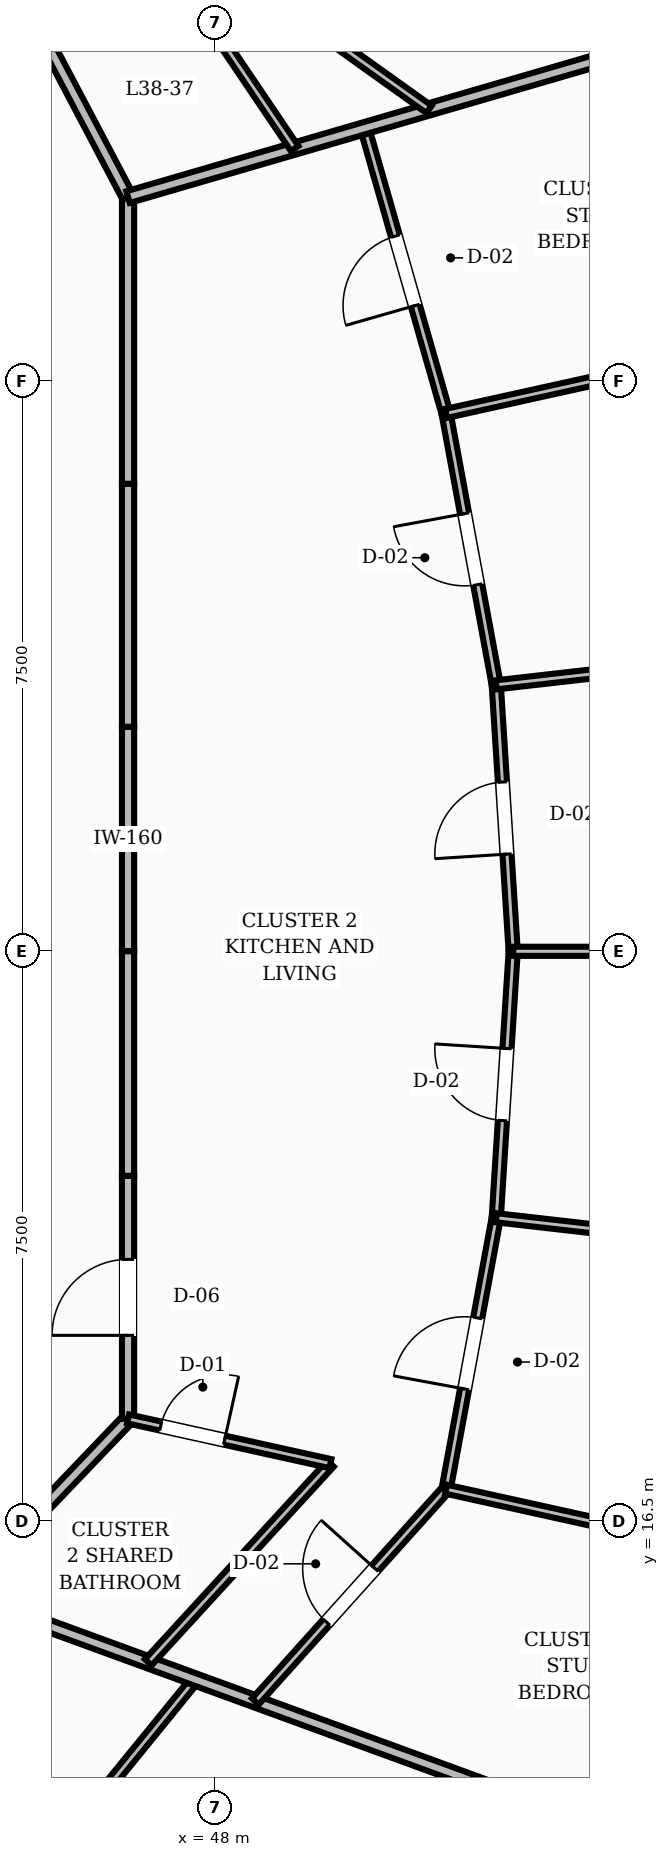
"""IFC4 building model, lengths in metres.
Left out: names, types, materials, properties, quantities, classifications, styles, units other than length and angle.
Written with IfcOpenShell. Run it as: python <this file> out.ifc"""

import sys

from ifc_helpers import new_model, si_unit, direction, frame, frame_2d, origin, place, context, subcontext, project, spatial, rectangle, extrude, element, fill, save


model = new_model("IFC4")
c1 = context("Model", 3, precision=1e-05, world=origin(), true_north=direction((0.0, 1.0)))
c2 = subcontext(c1, "Body", "Model", "MODEL_VIEW")
j1 = project(units=[si_unit("LENGTHUNIT", "METRE"), si_unit("PLANEANGLEUNIT", "RADIAN")], contexts=[c1])
p1 = place(None, origin())
s1 = spatial("IfcSite", under=j1, at=p1, CompositionType="ELEMENT")
p2 = place(p1, origin())
s2 = spatial("IfcBuilding", under=s1, at=p2, CompositionType="ELEMENT")
p3 = place(p2, frame((0.0, 0.0, 149.6)))
s3 = spatial("IfcBuildingStorey", under=s2, at=p3, CompositionType="ELEMENT", Elevation=149.6)
p4 = place(p3, frame((46.85, 24.0, 0.0), z_axis=(0.0, 0.0, 1.0), x_axis=(0.0, 1.0, 0.0)))
e1 = element("IfcWall", 1, at=p4, inside=s3, PredefinedType="SOLIDWALL", context=c2, shape_type="SweptSolid", body=[
    extrude(rectangle(XDim=2.954, YDim=0.16, at=frame_2d((1.477, 0.0))), origin(), (0.0, 0.0, 1.0), 2.8),
])
p5 = place(p3, frame((46.85, 26.954, 0.0), z_axis=(0.0, 0.0, 1.0), x_axis=(0.0, 1.0, 0.0)))
e2 = element("IfcWall", 2, at=p5, inside=s3, PredefinedType="SOLIDWALL", context=c2, shape_type="SweptSolid", body=[
    extrude(rectangle(XDim=3.197, YDim=0.16, at=frame_2d((1.599, 0.0))), origin(), (0.0, 0.0, 1.0), 2.8),
])
p6 = place(p3, frame((46.85, 30.151, 0.0), z_axis=(0.0, 0.0, 1.0), x_axis=(0.0, 1.0, 0.0)))
e3 = element("IfcWall", 3, at=p6, inside=s3, PredefinedType="SOLIDWALL", context=c2, shape_type="SweptSolid", body=[
    extrude(rectangle(XDim=3.771, YDim=0.16, at=frame_2d((1.886, 0.0))), origin(), (0.0, 0.0, 1.0), 2.8),
])
p7 = place(p3, frame((46.85, 33.923, 0.0), z_axis=(0.0, 0.0, 1.0), x_axis=(-0.466093963429, 0.884735224378, 0.0)))
e4 = element("IfcWall", 4, at=p7, inside=s3, PredefinedType="SOLIDWALL", context=c2, shape_type="SweptSolid", body=[
    extrude(rectangle(XDim=3.648, YDim=0.16, at=frame_2d((1.824, 0.0))), origin(), (0.0, 0.0, 1.0), 2.8),
])
p8 = place(p3, frame((44.65, 15.548, 0.0), z_axis=(0.0, 0.0, 1.0), x_axis=(0.691055487108, 0.722801711216, 0.0)))
e5 = element("IfcWall", 5, at=p8, inside=s3, PredefinedType="SOLIDWALL", context=c2, shape_type="SweptSolid", body=[
    extrude(rectangle(XDim=3.184, YDim=0.16, at=frame_2d((1.592, 0.0))), origin(), (0.0, 0.0, 1.0), 2.8),
])
p9 = place(p3, frame((46.85, 17.849, 0.0), z_axis=(0.0, 0.0, 1.0), x_axis=(0.0, 1.0, 0.0)))
e6 = element("IfcWall", 6, at=p9, inside=s3, PredefinedType="SOLIDWALL", context=c2, shape_type="SweptSolid", body=[
    extrude(rectangle(XDim=3.197, YDim=0.16, at=frame_2d((1.599, 0.0))), origin(), (0.0, 0.0, 1.0), 2.8),
])
p10 = place(p9, frame((1.099, 0.0, 0.0)))
e7 = element("IfcOpeningElement", 7, at=p10, cuts=e6, PredefinedType="OPENING", context=c2, shape_type="SweptSolid", body=[
    extrude(rectangle(XDim=1.0, YDim=2.1, at=frame_2d((0.5, 1.05))), frame((0.0, 0.09, 0.0), z_axis=(0.0, -1.0, 0.0), x_axis=(1.0, 0.0, 0.0)), (0.0, 0.0, 1.0), 0.18),
])
p11 = place(p3, frame((46.85, 21.046, 0.0), z_axis=(0.0, 0.0, 1.0), x_axis=(0.0, 1.0, 0.0)))
e8 = element("IfcWall", 8, at=p11, inside=s3, PredefinedType="SOLIDWALL", context=c2, shape_type="SweptSolid", body=[
    extrude(rectangle(XDim=2.954, YDim=0.16, at=frame_2d((1.477, 0.0))), origin(), (0.0, 0.0, 1.0), 2.8),
])
p12 = place(p3, frame((45.504, 11.683, 0.0), z_axis=(0.0, 0.0, 1.0), x_axis=(0.631277203428, 0.775557278628, 0.0)))
e9 = element("IfcWall", 9, at=p12, inside=s3, PredefinedType="PARTITIONING", context=c2, shape_type="SweptSolid", body=[
    extrude(rectangle(XDim=3.53, YDim=0.12, at=frame_2d((1.765, 0.0))), origin(), (0.0, 0.0, 1.0), 2.8),
])
p13 = place(p3, frame((44.65, 15.548, 0.0), z_axis=(0.0, 0.0, 1.0), x_axis=(0.939222726392, -0.343308418524, 0.0)))
e10 = element("IfcWall", 10, at=p13, inside=s3, PredefinedType="SOLIDWALL", context=c2, shape_type="SweptSolid", body=[
    extrude(rectangle(XDim=9.327, YDim=0.16, at=frame_2d((4.663, 0.0))), origin(), (0.0, 0.0, 1.0), 2.8),
])
p14 = place(p3, frame((47.116, 14.646, 0.0), z_axis=(0.0, 0.0, 1.0), x_axis=(0.675771389029, 0.737111273669, 0.0)))
e11 = element("IfcWall", 11, at=p14, inside=s3, PredefinedType="PARTITIONING", context=c2, shape_type="SweptSolid", body=[
    extrude(rectangle(XDim=3.546, YDim=0.12, at=frame_2d((1.773, 0.0))), origin(), (0.0, 0.0, 1.0), 2.8),
])
p15 = place(p3, frame((46.85, 17.849, 0.0), z_axis=(0.0, 0.0, 1.0), x_axis=(0.976420347176, -0.215877987808, 0.0)))
e12 = element("IfcWall", 12, at=p15, inside=s3, PredefinedType="PARTITIONING", context=c2, shape_type="SweptSolid", body=[
    extrude(rectangle(XDim=2.727, YDim=0.12, at=frame_2d((1.363, 0.0))), origin(), (0.0, 0.0, 1.0), 2.8),
])
p16 = place(p15, frame((0.44, 0.0, 0.0)))
e13 = element("IfcOpeningElement", 13, at=p16, cuts=e12, PredefinedType="OPENING", context=c2, shape_type="SweptSolid", body=[
    extrude(rectangle(XDim=0.86, YDim=2.1, at=frame_2d((0.43, 1.05))), frame((0.0, 0.07, 0.0), z_axis=(0.0, -1.0, 0.0), x_axis=(1.0, 0.0, 0.0)), (0.0, 0.0, 1.0), 0.14),
])
p17 = place(p3, frame((48.525, 14.131, 0.0), z_axis=(0.0, 0.0, 1.0), x_axis=(0.668314174757, 0.743879132533, 0.0)))
e14 = element("IfcWall", 14, at=p17, inside=s3, PredefinedType="PARTITIONING", context=c2, shape_type="SweptSolid", body=[
    extrude(rectangle(XDim=3.754, YDim=0.12, at=frame_2d((1.877, 0.0))), origin(), (0.0, 0.0, 1.0), 2.8),
])
p18 = place(p17, frame((1.402, 0.0, 0.0)))
e15 = element("IfcOpeningElement", 15, at=p18, cuts=e14, PredefinedType="OPENING", context=c2, shape_type="SweptSolid", body=[
    extrude(rectangle(XDim=0.95, YDim=2.1, at=frame_2d((0.475, 1.05))), frame((0.0, 0.07, 0.0), z_axis=(0.0, -1.0, 0.0), x_axis=(1.0, 0.0, 0.0)), (0.0, 0.0, 1.0), 0.14),
])
p19 = place(p3, frame((51.034, 16.924, 0.0), z_axis=(0.0, 0.0, 1.0), x_axis=(0.181807554869, 0.9833341309, 0.0)))
e16 = element("IfcWall", 16, at=p19, inside=s3, PredefinedType="PARTITIONING", context=c2, shape_type="SweptSolid", body=[
    extrude(rectangle(XDim=3.631, YDim=0.12, at=frame_2d((1.815, 0.0))), origin(), (0.0, 0.0, 1.0), 2.8),
])
p20 = place(p19, frame((1.341, 0.0, 0.0)))
e17 = element("IfcOpeningElement", 17, at=p20, cuts=e16, PredefinedType="OPENING", context=c2, shape_type="SweptSolid", body=[
    extrude(rectangle(XDim=0.95, YDim=2.1, at=frame_2d((0.475, 1.05))), frame((0.0, 0.07, 0.0), z_axis=(0.0, -1.0, 0.0), x_axis=(1.0, 0.0, 0.0)), (0.0, 0.0, 1.0), 0.14),
])
p21 = place(p3, frame((51.034, 16.924, 0.0), z_axis=(0.0, 0.0, 1.0), x_axis=(0.976410849666, -0.21592094075, 0.0)))
e18 = element("IfcWall", 18, at=p21, inside=s3, PredefinedType="PARTITIONING", context=c2, shape_type="SweptSolid", body=[
    extrude(rectangle(XDim=5.404, YDim=0.12, at=frame_2d((2.702, 0.0))), origin(), (0.0, 0.0, 1.0), 2.8),
])
p22 = place(p3, frame((51.694, 20.494, 0.0), z_axis=(0.0, 0.0, 1.0), x_axis=(0.063455671899, 0.99798465805, 0.0)))
e19 = element("IfcWall", 19, at=p22, inside=s3, PredefinedType="PARTITIONING", context=c2, shape_type="SweptSolid", body=[
    extrude(rectangle(XDim=3.513, YDim=0.12, at=frame_2d((1.756, 0.0))), origin(), (0.0, 0.0, 1.0), 2.8),
])
p23 = place(p22, frame((1.281, 0.0, 0.0)))
e20 = element("IfcOpeningElement", 20, at=p23, cuts=e19, PredefinedType="OPENING", context=c2, shape_type="SweptSolid", body=[
    extrude(rectangle(XDim=0.95, YDim=2.1, at=frame_2d((0.475, 1.05))), frame((0.0, 0.07, 0.0), z_axis=(0.0, -1.0, 0.0), x_axis=(1.0, 0.0, 0.0)), (0.0, 0.0, 1.0), 0.14),
])
p24 = place(p3, frame((51.694, 20.494, 0.0), z_axis=(0.0, 0.0, 1.0), x_axis=(0.993580655241, -0.113125954279, 0.0)))
e21 = element("IfcWall", 21, at=p24, inside=s3, PredefinedType="PARTITIONING", context=c2, shape_type="SweptSolid", body=[
    extrude(rectangle(XDim=6.155, YDim=0.12, at=frame_2d((3.078, 0.0))), origin(), (0.0, 0.0, 1.0), 2.8),
])
p25 = place(p3, frame((51.917, 24.0, 0.0), z_axis=(0.0, 0.0, 1.0), x_axis=(-0.063455671899, 0.99798465805, 0.0)))
e22 = element("IfcWall", 22, at=p25, inside=s3, PredefinedType="PARTITIONING", context=c2, shape_type="SweptSolid", body=[
    extrude(rectangle(XDim=3.513, YDim=0.12, at=frame_2d((1.756, 0.0))), origin(), (0.0, 0.0, 1.0), 2.8),
])
p26 = place(p25, frame((1.281, 0.0, 0.0)))
e23 = element("IfcOpeningElement", 23, at=p26, cuts=e22, PredefinedType="OPENING", context=c2, shape_type="SweptSolid", body=[
    extrude(rectangle(XDim=0.95, YDim=2.1, at=frame_2d((0.475, 1.05))), frame((0.0, 0.07, 0.0), z_axis=(0.0, -1.0, 0.0), x_axis=(1.0, 0.0, 0.0)), (0.0, 0.0, 1.0), 0.14),
])
p27 = place(p3, frame((51.917, 24.0, 0.0), z_axis=(0.0, 0.0, 1.0), x_axis=(1.0, 0.0, 0.0)))
e24 = element("IfcWall", 24, at=p27, inside=s3, PredefinedType="PARTITIONING", context=c2, shape_type="SweptSolid", body=[
    extrude(rectangle(XDim=6.399, YDim=0.12, at=frame_2d((3.199, 0.0))), origin(), (0.0, 0.0, 1.0), 2.8),
])
p28 = place(p3, frame((51.694, 27.506, 0.0), z_axis=(0.0, 0.0, 1.0), x_axis=(-0.181807554869, 0.9833341309, 0.0)))
e25 = element("IfcWall", 25, at=p28, inside=s3, PredefinedType="PARTITIONING", context=c2, shape_type="SweptSolid", body=[
    extrude(rectangle(XDim=3.631, YDim=0.12, at=frame_2d((1.815, 0.0))), origin(), (0.0, 0.0, 1.0), 2.8),
])
p29 = place(p28, frame((1.341, 0.0, 0.0)))
e26 = element("IfcOpeningElement", 26, at=p29, cuts=e25, PredefinedType="OPENING", context=c2, shape_type="SweptSolid", body=[
    extrude(rectangle(XDim=0.95, YDim=2.1, at=frame_2d((0.475, 1.05))), frame((0.0, 0.07, 0.0), z_axis=(0.0, -1.0, 0.0), x_axis=(1.0, 0.0, 0.0)), (0.0, 0.0, 1.0), 0.14),
])
p30 = place(p3, frame((51.694, 27.506, 0.0), z_axis=(0.0, 0.0, 1.0), x_axis=(0.993580655241, 0.113125954279, 0.0)))
e27 = element("IfcWall", 27, at=p30, inside=s3, PredefinedType="PARTITIONING", context=c2, shape_type="SweptSolid", body=[
    extrude(rectangle(XDim=6.155, YDim=0.12, at=frame_2d((3.078, 0.0))), origin(), (0.0, 0.0, 1.0), 2.8),
])
p31 = place(p3, frame((51.034, 31.076, 0.0), z_axis=(0.0, 0.0, 1.0), x_axis=(-0.274679817616, 0.961535749619, 0.0)))
e28 = element("IfcWall", 28, at=p31, inside=s3, PredefinedType="PARTITIONING", context=c2, shape_type="SweptSolid", body=[
    extrude(rectangle(XDim=3.903, YDim=0.12, at=frame_2d((1.951, 0.0))), origin(), (0.0, 0.0, 1.0), 2.8),
])
p32 = place(p31, frame((1.476, 0.0, 0.0)))
e29 = element("IfcOpeningElement", 29, at=p32, cuts=e28, PredefinedType="OPENING", context=c2, shape_type="SweptSolid", body=[
    extrude(rectangle(XDim=0.95, YDim=2.1, at=frame_2d((0.475, 1.05))), frame((0.0, 0.07, 0.0), z_axis=(0.0, -1.0, 0.0), x_axis=(1.0, 0.0, 0.0)), (0.0, 0.0, 1.0), 0.14),
])
p33 = place(p3, frame((51.034, 31.076, 0.0), z_axis=(0.0, 0.0, 1.0), x_axis=(0.976410849666, 0.21592094075, 0.0)))
e30 = element("IfcWall", 30, at=p33, inside=s3, PredefinedType="PARTITIONING", context=c2, shape_type="SweptSolid", body=[
    extrude(rectangle(XDim=5.404, YDim=0.12, at=frame_2d((2.702, 0.0))), origin(), (0.0, 0.0, 1.0), 2.8),
])
p34 = place(p3, frame((46.85, 33.923, 0.0), z_axis=(0.0, 0.0, 1.0), x_axis=(0.960106072599, 0.279636065911, 0.0)))
e31 = element("IfcWall", 31, at=p34, inside=s3, PredefinedType="SOLIDWALL", context=c2, shape_type="SweptSolid", body=[
    extrude(rectangle(XDim=7.316, YDim=0.16, at=frame_2d((3.658, 0.0))), origin(), (0.0, 0.0, 1.0), 2.8),
])
p35 = place(p3, frame((49.042, 34.561, 0.0), z_axis=(0.0, 0.0, 1.0), x_axis=(-0.559875946145, 0.82857644483, 0.0)))
e32 = element("IfcWall", 32, at=p35, inside=s3, PredefinedType="PARTITIONING", context=c2, shape_type="SweptSolid", body=[
    extrude(rectangle(XDim=3.911, YDim=0.12, at=frame_2d((1.955, 0.0))), origin(), (0.0, 0.0, 1.0), 2.8),
])
p36 = place(p3, frame((50.811, 35.076, 0.0), z_axis=(0.0, 0.0, 1.0), x_axis=(-0.813619479842, 0.581397748553, 0.0)))
e33 = element("IfcWall", 33, at=p36, inside=s3, PredefinedType="PARTITIONING", context=c2, shape_type="SweptSolid", body=[
    extrude(rectangle(XDim=8.25, YDim=0.12, at=frame_2d((4.125, 0.0))), origin(), (0.0, 0.0, 1.0), 2.8),
])
p37 = place(p36, frame((5.062, 0.0, 0.0)))
e34 = element("IfcOpeningElement", 34, at=p37, cuts=e33, PredefinedType="OPENING", context=c2, shape_type="SweptSolid", body=[
    extrude(rectangle(XDim=0.95, YDim=2.1, at=frame_2d((0.475, 1.05))), frame((0.0, 0.07, 0.0), z_axis=(0.0, -1.0, 0.0), x_axis=(1.0, 0.0, 0.0)), (0.0, 0.0, 1.0), 0.14),
])
p38 = place(p16, origin())
e35 = element("IfcDoor", 35, at=p38, inside=s3, OperationType="SINGLE_SWING_RIGHT", PredefinedType="DOOR", context=c2, shape_type="SweptSolid", body=[
    extrude(rectangle(XDim=0.86, YDim=2.1, at=frame_2d((0.43, 1.05))), frame((0.0, 0.025, 0.0), z_axis=(0.0, -1.0, 0.0), x_axis=(1.0, 0.0, 0.0)), (0.0, 0.0, 1.0), 0.05),
])
fill(e13, e35)
p39 = place(p10, origin())
e36 = element("IfcDoor", 36, at=p39, inside=s3, OperationType="SINGLE_SWING_LEFT", PredefinedType="DOOR", context=c2, shape_type="SweptSolid", body=[
    extrude(rectangle(XDim=1.0, YDim=2.1, at=frame_2d((0.5, 1.05))), frame((0.0, 0.025, 0.0), z_axis=(0.0, -1.0, 0.0), x_axis=(1.0, 0.0, 0.0)), (0.0, 0.0, 1.0), 0.05),
])
fill(e7, e36)
p40 = place(p18, origin())
e37 = element("IfcDoor", 37, at=p40, inside=s3, OperationType="SINGLE_SWING_RIGHT", PredefinedType="DOOR", context=c2, shape_type="SweptSolid", body=[
    extrude(rectangle(XDim=0.95, YDim=2.1, at=frame_2d((0.475, 1.05))), frame((0.0, 0.025, 0.0), z_axis=(0.0, -1.0, 0.0), x_axis=(1.0, 0.0, 0.0)), (0.0, 0.0, 1.0), 0.05),
])
fill(e15, e37)
p41 = place(p20, origin())
e38 = element("IfcDoor", 38, at=p41, inside=s3, OperationType="SINGLE_SWING_LEFT", PredefinedType="DOOR", context=c2, shape_type="SweptSolid", body=[
    extrude(rectangle(XDim=0.95, YDim=2.1, at=frame_2d((0.475, 1.05))), frame((0.0, 0.025, 0.0), z_axis=(0.0, -1.0, 0.0), x_axis=(1.0, 0.0, 0.0)), (0.0, 0.0, 1.0), 0.05),
])
fill(e17, e38)
p42 = place(p23, origin())
e39 = element("IfcDoor", 39, at=p42, inside=s3, OperationType="SINGLE_SWING_RIGHT", PredefinedType="DOOR", context=c2, shape_type="SweptSolid", body=[
    extrude(rectangle(XDim=0.95, YDim=2.1, at=frame_2d((0.475, 1.05))), frame((0.0, 0.025, 0.0), z_axis=(0.0, -1.0, 0.0), x_axis=(1.0, 0.0, 0.0)), (0.0, 0.0, 1.0), 0.05),
])
fill(e20, e39)
p43 = place(p26, origin())
e40 = element("IfcDoor", 40, at=p43, inside=s3, OperationType="SINGLE_SWING_LEFT", PredefinedType="DOOR", context=c2, shape_type="SweptSolid", body=[
    extrude(rectangle(XDim=0.95, YDim=2.1, at=frame_2d((0.475, 1.05))), frame((0.0, 0.025, 0.0), z_axis=(0.0, -1.0, 0.0), x_axis=(1.0, 0.0, 0.0)), (0.0, 0.0, 1.0), 0.05),
])
fill(e23, e40)
p44 = place(p29, origin())
e41 = element("IfcDoor", 41, at=p44, inside=s3, OperationType="SINGLE_SWING_RIGHT", PredefinedType="DOOR", context=c2, shape_type="SweptSolid", body=[
    extrude(rectangle(XDim=0.95, YDim=2.1, at=frame_2d((0.475, 1.05))), frame((0.0, 0.025, 0.0), z_axis=(0.0, -1.0, 0.0), x_axis=(1.0, 0.0, 0.0)), (0.0, 0.0, 1.0), 0.05),
])
fill(e26, e41)
p45 = place(p32, origin())
e42 = element("IfcDoor", 42, at=p45, inside=s3, OperationType="SINGLE_SWING_LEFT", PredefinedType="DOOR", context=c2, shape_type="SweptSolid", body=[
    extrude(rectangle(XDim=0.95, YDim=2.1, at=frame_2d((0.475, 1.05))), frame((0.0, 0.025, 0.0), z_axis=(0.0, -1.0, 0.0), x_axis=(1.0, 0.0, 0.0)), (0.0, 0.0, 1.0), 0.05),
])
fill(e29, e42)
save(model, sys.argv[1])
